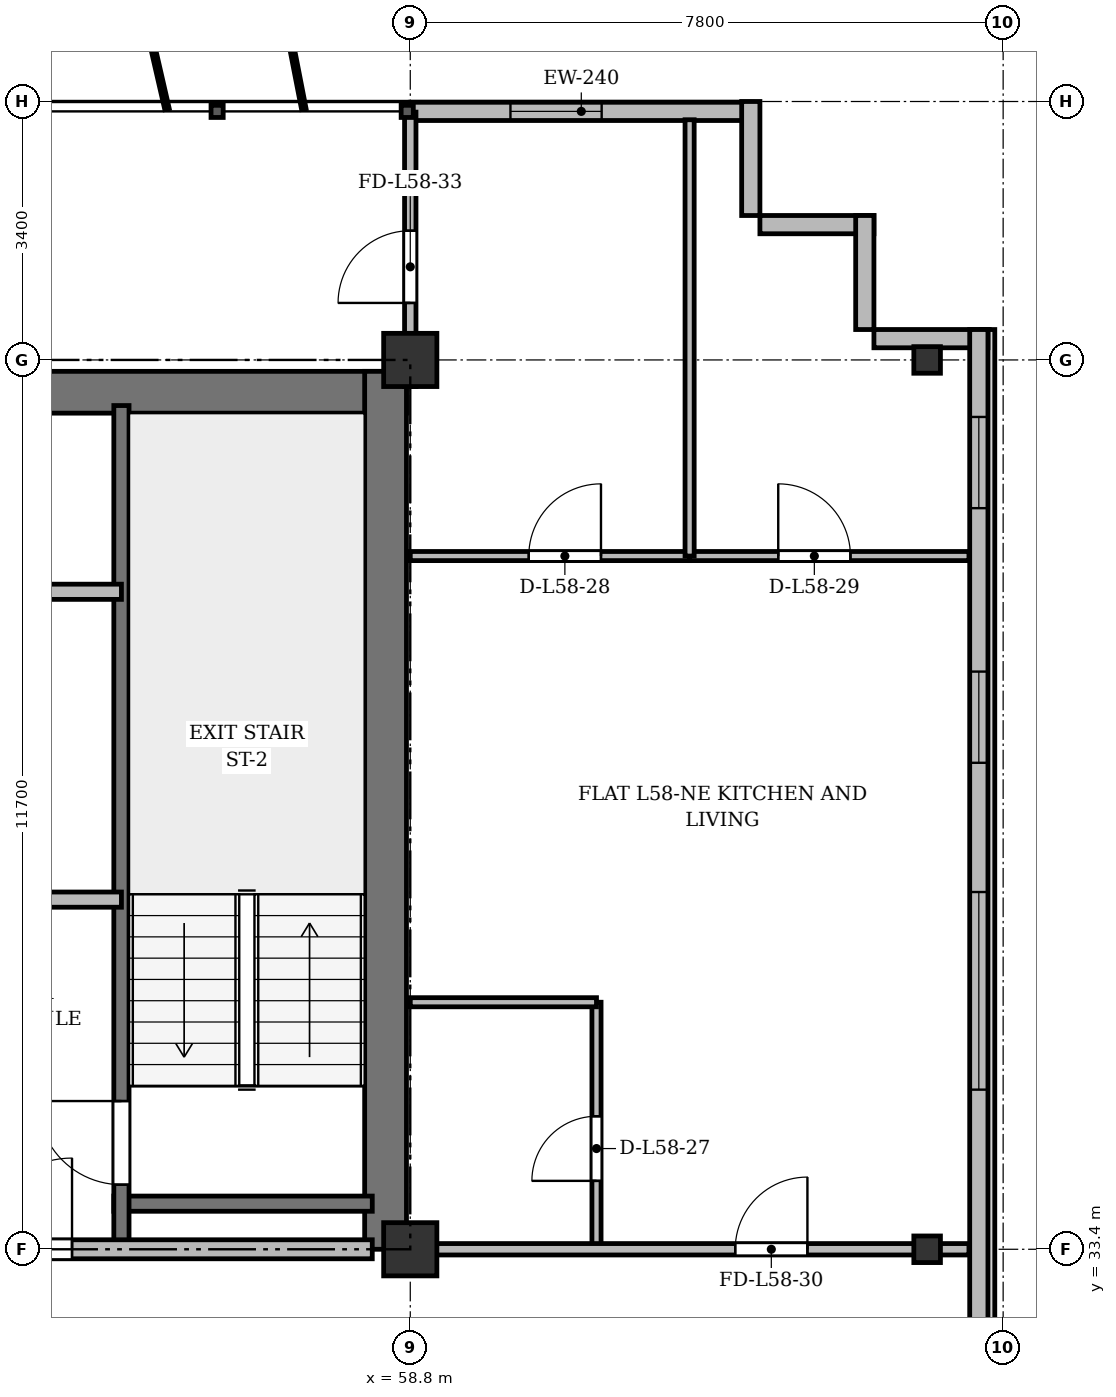
"""IFC4 building model, lengths in metres.
Left out: names, types, materials, properties, quantities, classifications, styles, units other than length and angle.
Written with IfcOpenShell. Run it as: python <this file> out.ifc"""

import sys

from ifc_helpers import new_model, si_unit, direction, frame, frame_2d, origin, origin_2d, place, context, subcontext, project, spatial, rectangle, i_section, extrude, source, transform, mapped, element, fill, save


model = new_model("IFC4")
c1 = context("Model", 3, precision=1e-05, world=origin(), true_north=direction((0.0, 1.0)))
c2 = subcontext(c1, "Body", "Model", "MODEL_VIEW")
j1 = project(units=[si_unit("LENGTHUNIT", "METRE"), si_unit("PLANEANGLEUNIT", "RADIAN")], contexts=[c1])
p1 = place(None, origin())
s1 = spatial("IfcSite", under=j1, at=p1, CompositionType="ELEMENT")
p2 = place(p1, origin())
s2 = spatial("IfcBuilding", under=s1, at=p2, CompositionType="ELEMENT")
p3 = place(p2, frame((0.0, 0.0, 222.9)))
s3 = spatial("IfcBuildingStorey", under=s2, at=p3, CompositionType="ELEMENT", Elevation=222.9)
m1 = source(origin(), c2, "Body", "SweptSolid", [
    extrude(rectangle(XDim=0.7, YDim=0.7, at=origin_2d()), origin(), (0.0, 0.0, 1.0), 3.6),
])
for number, where, z_axis, x_axis in (
    (1, (58.8, 33.4, 0.0), (0.0, 0.0, 1.0), (1.0, 0.0, 0.0)),
    (2, (58.8, 45.1, 0.0), (0.0, 0.0, 1.0), (1.0, 0.0, 0.0)),
):
    element("IfcColumn", number, at=place(p3, frame(where, z_axis=z_axis, x_axis=x_axis)), inside=s3, PredefinedType="COLUMN", context=c2, shape_type="MappedRepresentation", body=[
        mapped(m1, transform((0.0, 0.0, 0.0), x_axis=(1.0, 0.0, 0.0), y_axis=(0.0, 1.0, 0.0), z_axis=(0.0, 0.0, 1.0), scale=1.0)),
    ])
m2 = source(origin(), c2, "Body", "SweptSolid", [
    extrude(i_section(OverallWidth=0.35, OverallDepth=0.35, WebThickness=0.018, FlangeThickness=0.028, at=origin_2d()), origin(), (0.0, 0.0, 1.0), 3.6),
])
for number, where, z_axis, x_axis in (
    (3, (65.6, 33.4, 0.0), (0.0, 0.0, 1.0), (1.0, 0.0, 0.0)),
    (4, (65.6, 45.1, 0.0), (0.0, 0.0, 1.0), (1.0, 0.0, 0.0)),
):
    element("IfcColumn", number, at=place(p3, frame(where, z_axis=z_axis, x_axis=x_axis)), inside=s3, PredefinedType="COLUMN", context=c2, shape_type="MappedRepresentation", body=[
        mapped(m2, transform((0.0, 0.0, 0.0), x_axis=(1.0, 0.0, 0.0), y_axis=(0.0, 1.0, 0.0), z_axis=(0.0, 0.0, 1.0), scale=1.0)),
    ])
p4 = place(p3, frame((58.8, 48.37, 0.0), z_axis=(0.0, 0.0, 1.0), x_axis=(1.0, 0.0, 0.0)))
e5 = element("IfcWall", 5, at=p4, inside=s3, PredefinedType="SOLIDWALL", context=c2, shape_type="SweptSolid", body=[
    extrude(rectangle(XDim=4.5, YDim=0.24, at=frame_2d((2.25, 0.0))), origin(), (0.0, 0.0, 1.0), 3.36),
])
p5 = place(p4, frame((1.318, 0.0, 0.9)))
e6 = element("IfcOpeningElement", 6, at=p5, cuts=e5, PredefinedType="OPENING", context=c2, shape_type="SweptSolid", body=[
    extrude(rectangle(XDim=1.2, YDim=1.65, at=frame_2d((0.6, 0.825))), frame((0.0, 0.13, 0.0), z_axis=(0.0, -1.0, 0.0), x_axis=(1.0, 0.0, 0.0)), (0.0, 0.0, 1.0), 0.26),
])
for number, where, z_axis, x_axis in (
    (7, (63.28, 48.5, 0.0), (0.0, 0.0, 1.0), (0.0, -1.0, 0.0)),
    (8, (63.4, 46.88, 0.0), (0.0, 0.0, 1.0), (1.0, 0.0, 0.0)),
    (9, (64.78, 47.0, 0.0), (0.0, 0.0, 1.0), (0.0, -1.0, 0.0)),
    (10, (64.9, 45.38, 0.0), (0.0, 0.0, 1.0), (1.0, 0.0, 0.0)),
):
    element("IfcWall", number, at=place(p3, frame(where, z_axis=z_axis, x_axis=x_axis)), inside=s3, PredefinedType="SOLIDWALL", context=c2, shape_type="SweptSolid", body=[
        extrude(rectangle(XDim=1.5, YDim=0.24, at=frame_2d((0.75, 0.0))), origin(), (0.0, 0.0, 1.0), 3.36),
    ])
p6 = place(p3, frame((66.28, 45.5, 0.0), z_axis=(0.0, 0.0, 1.0), x_axis=(0.0, -1.0, 0.0)))
e11 = element("IfcWall", 11, at=p6, inside=s3, PredefinedType="SOLIDWALL", context=c2, shape_type="SweptSolid", body=[
    extrude(rectangle(XDim=39.1, YDim=0.24, at=frame_2d((19.55, 0.0))), origin(), (0.0, 0.0, 1.0), 3.36),
])
p7 = place(p6, frame((36.45, 0.0, 0.92)))
e12 = element("IfcOpeningElement", 12, at=p7, cuts=e11, PredefinedType="OPENING", context=c2, shape_type="SweptSolid", body=[
    extrude(rectangle(XDim=1.2, YDim=1.65, at=frame_2d((0.6, 0.825))), frame((0.0, 0.13, 0.0), z_axis=(0.0, -1.0, 0.0), x_axis=(1.0, 0.0, 0.0)), (0.0, 0.0, 1.0), 0.26),
])
p8 = place(p6, frame((32.8, 0.0, 0.92)))
e13 = element("IfcOpeningElement", 13, at=p8, cuts=e11, PredefinedType="OPENING", context=c2, shape_type="SweptSolid", body=[
    extrude(rectangle(XDim=2.6, YDim=1.9, at=frame_2d((1.3, 0.95))), frame((0.0, 0.13, 0.0), z_axis=(0.0, -1.0, 0.0), x_axis=(1.0, 0.0, 0.0)), (0.0, 0.0, 1.0), 0.26),
])
p9 = place(p6, frame((28.6, 0.0, 0.92)))
e14 = element("IfcOpeningElement", 14, at=p9, cuts=e11, PredefinedType="OPENING", context=c2, shape_type="SweptSolid", body=[
    extrude(rectangle(XDim=2.6, YDim=1.9, at=frame_2d((1.3, 0.95))), frame((0.0, 0.13, 0.0), z_axis=(0.0, -1.0, 0.0), x_axis=(1.0, 0.0, 0.0)), (0.0, 0.0, 1.0), 0.26),
])
p10 = place(p6, frame((21.4, 0.0, 0.92)))
e15 = element("IfcOpeningElement", 15, at=p10, cuts=e11, PredefinedType="OPENING", context=c2, shape_type="SweptSolid", body=[
    extrude(rectangle(XDim=2.6, YDim=1.9, at=frame_2d((1.3, 0.95))), frame((0.0, 0.13, 0.0), z_axis=(0.0, -1.0, 0.0), x_axis=(1.0, 0.0, 0.0)), (0.0, 0.0, 1.0), 0.26),
])
p11 = place(p6, frame((7.4, 0.0, 0.92)))
e16 = element("IfcOpeningElement", 16, at=p11, cuts=e11, PredefinedType="OPENING", context=c2, shape_type="SweptSolid", body=[
    extrude(rectangle(XDim=2.6, YDim=1.9, at=frame_2d((1.3, 0.95))), frame((0.0, 0.13, 0.0), z_axis=(0.0, -1.0, 0.0), x_axis=(1.0, 0.0, 0.0)), (0.0, 0.0, 1.0), 0.26),
])
p12 = place(p6, frame((4.5, 0.0, 0.92)))
e17 = element("IfcOpeningElement", 17, at=p12, cuts=e11, PredefinedType="OPENING", context=c2, shape_type="SweptSolid", body=[
    extrude(rectangle(XDim=1.2, YDim=1.65, at=frame_2d((0.6, 0.825))), frame((0.0, 0.13, 0.0), z_axis=(0.0, -1.0, 0.0), x_axis=(1.0, 0.0, 0.0)), (0.0, 0.0, 1.0), 0.26),
])
p13 = place(p6, frame((1.15, 0.0, 0.92)))
e18 = element("IfcOpeningElement", 18, at=p13, cuts=e11, PredefinedType="OPENING", context=c2, shape_type="SweptSolid", body=[
    extrude(rectangle(XDim=1.2, YDim=1.65, at=frame_2d((0.6, 0.825))), frame((0.0, 0.13, 0.0), z_axis=(0.0, -1.0, 0.0), x_axis=(1.0, 0.0, 0.0)), (0.0, 0.0, 1.0), 0.26),
])
p14 = place(p3, frame((15.65, 44.675, 0.0), z_axis=(0.0, 0.0, 1.0), x_axis=(1.0, 0.0, 0.0)))
e19 = element("IfcWall", 19, at=p14, inside=s3, PredefinedType="SHEAR", context=c2, shape_type="SweptSolid", body=[
    extrude(rectangle(XDim=43.1, YDim=0.55, at=frame_2d((21.55, 0.0))), origin(), (0.0, 0.0, 1.0), 3.36),
])
p15 = place(p3, frame((58.475, 33.4, 0.0), z_axis=(0.0, 0.0, 1.0), x_axis=(0.0, 1.0, 0.0)))
e20 = element("IfcWall", 20, at=p15, inside=s3, PredefinedType="SHEAR", context=c2, shape_type="SweptSolid", body=[
    extrude(rectangle(XDim=11.55, YDim=0.55, at=frame_2d((5.775, 0.0))), origin(), (0.0, 0.0, 1.0), 3.36),
])
p16 = place(p3, frame((54.9, 34.0, 0.0), z_axis=(0.0, 0.0, 1.0), x_axis=(1.0, 0.0, 0.0)))
e21 = element("IfcWall", 21, at=p16, inside=s3, PredefinedType="SHEAR", context=c2, shape_type="SweptSolid", body=[
    extrude(rectangle(XDim=3.4, YDim=0.2, at=frame_2d((1.7, 0.0))), origin(), (0.0, 0.0, 1.0), 3.36),
])
p17 = place(p3, frame((55.0, 33.4, 0.0), z_axis=(0.0, 0.0, 1.0), x_axis=(0.0, 1.0, 0.0)))
e22 = element("IfcWall", 22, at=p17, inside=s3, PredefinedType="SHEAR", context=c2, shape_type="SweptSolid", body=[
    extrude(rectangle(XDim=11.1, YDim=0.2, at=frame_2d((5.55, 0.0))), origin(), (0.0, 0.0, 1.0), 3.36),
])
p18 = place(p17, frame((0.85, 0.0, 0.0)))
e23 = element("IfcOpeningElement", 23, at=p18, cuts=e22, PredefinedType="OPENING", context=c2, shape_type="SweptSolid", body=[
    extrude(rectangle(XDim=1.1, YDim=2.15, at=frame_2d((0.55, 1.075))), frame((0.0, 0.11, 0.0), z_axis=(0.0, -1.0, 0.0), x_axis=(1.0, 0.0, 0.0)), (0.0, 0.0, 1.0), 0.22),
])
p19 = place(p3, frame((47.15, 42.05, 0.0), z_axis=(0.0, 0.0, 1.0), x_axis=(1.0, 0.0, 0.0)))
e24 = element("IfcWall", 24, at=p19, inside=s3, PredefinedType="SOLIDWALL", context=c2, shape_type="SweptSolid", body=[
    extrude(rectangle(XDim=7.85, YDim=0.2, at=frame_2d((3.925, 0.0))), origin(), (0.0, 0.0, 1.0), 2.86),
])
p20 = place(p19, frame((0.75, 0.0, 0.0)))
e25 = element("IfcOpeningElement", 25, at=p20, cuts=e24, PredefinedType="OPENING", context=c2, shape_type="SweptSolid", body=[
    extrude(rectangle(XDim=0.9, YDim=2.1, at=frame_2d((0.45, 1.05))), frame((0.0, 0.11, 0.0), z_axis=(0.0, -1.0, 0.0), x_axis=(1.0, 0.0, 0.0)), (0.0, 0.0, 1.0), 0.22),
])
p21 = place(p19, frame((3.85, 0.0, 0.0)))
e26 = element("IfcOpeningElement", 26, at=p21, cuts=e24, PredefinedType="OPENING", context=c2, shape_type="SweptSolid", body=[
    extrude(rectangle(XDim=0.9, YDim=2.1, at=frame_2d((0.45, 1.05))), frame((0.0, 0.11, 0.0), z_axis=(0.0, -1.0, 0.0), x_axis=(1.0, 0.0, 0.0)), (0.0, 0.0, 1.0), 0.22),
])
p22 = place(p3, frame((52.45, 38.0, 0.0), z_axis=(0.0, 0.0, 1.0), x_axis=(1.0, 0.0, 0.0)))
e27 = element("IfcWall", 27, at=p22, inside=s3, PredefinedType="PARTITIONING", context=c2, shape_type="SweptSolid", body=[
    extrude(rectangle(XDim=2.55, YDim=0.2, at=frame_2d((1.275, 0.0))), origin(), (0.0, 0.0, 1.0), 3.36),
])
p23 = place(p3, frame((47.15, 33.4, 0.0), z_axis=(0.0, 0.0, 1.0), x_axis=(1.0, 0.0, 0.0)))
e28 = element("IfcWall", 28, at=p23, inside=s3, PredefinedType="PARTITIONING", context=c2, shape_type="SweptSolid", body=[
    extrude(rectangle(XDim=11.15, YDim=0.25, at=frame_2d((5.575, 0.0))), origin(), (0.0, 0.0, 1.0), 2.91),
])
p24 = place(p23, frame((0.7, 0.0, 0.0)))
e29 = element("IfcOpeningElement", 29, at=p24, cuts=e28, PredefinedType="OPENING", context=c2, shape_type="SweptSolid", body=[
    extrude(rectangle(XDim=0.95, YDim=2.15, at=frame_2d((0.475, 1.075))), frame((0.0, 0.135, 0.0), z_axis=(0.0, -1.0, 0.0), x_axis=(1.0, 0.0, 0.0)), (0.0, 0.0, 1.0), 0.27),
])
p25 = place(p23, frame((6.0, 0.0, 0.0)))
e30 = element("IfcOpeningElement", 30, at=p25, cuts=e28, PredefinedType="OPENING", context=c2, shape_type="SweptSolid", body=[
    extrude(rectangle(XDim=1.2, YDim=2.15, at=frame_2d((0.6, 1.075))), frame((0.0, 0.135, 0.0), z_axis=(0.0, -1.0, 0.0), x_axis=(1.0, 0.0, 0.0)), (0.0, 0.0, 1.0), 0.27),
])
p26 = place(p3, frame((61.25, 33.4, 0.0), z_axis=(0.0, 0.0, 1.0), x_axis=(0.0, 1.0, 0.0)))
e31 = element("IfcWall", 31, at=p26, inside=s3, PredefinedType="PARTITIONING", context=c2, shape_type="SweptSolid", body=[
    extrude(rectangle(XDim=3.25, YDim=0.12, at=frame_2d((1.625, 0.0))), origin(), (0.0, 0.0, 1.0), 2.91),
])
p27 = place(p26, frame((0.9, 0.0, 0.0)))
e32 = element("IfcOpeningElement", 32, at=p27, cuts=e31, PredefinedType="OPENING", context=c2, shape_type="SweptSolid", body=[
    extrude(rectangle(XDim=0.85, YDim=2.1, at=frame_2d((0.425, 1.05))), frame((0.0, 0.07, 0.0), z_axis=(0.0, -1.0, 0.0), x_axis=(1.0, 0.0, 0.0)), (0.0, 0.0, 1.0), 0.14),
])
p28 = place(p3, frame((58.8, 36.65, 0.0), z_axis=(0.0, 0.0, 1.0), x_axis=(1.0, 0.0, 0.0)))
e33 = element("IfcWall", 33, at=p28, inside=s3, PredefinedType="PARTITIONING", context=c2, shape_type="SweptSolid", body=[
    extrude(rectangle(XDim=2.45, YDim=0.12, at=frame_2d((1.225, 0.0))), origin(), (0.0, 0.0, 1.0), 2.86),
])
p29 = place(p3, frame((58.8, 42.52, 0.0), z_axis=(0.0, 0.0, 1.0), x_axis=(1.0, 0.0, 0.0)))
e34 = element("IfcWall", 34, at=p29, inside=s3, PredefinedType="PARTITIONING", context=c2, shape_type="SweptSolid", body=[
    extrude(rectangle(XDim=3.675, YDim=0.12, at=frame_2d((1.837, 0.0))), origin(), (0.0, 0.0, 1.0), 2.86),
])
p30 = place(p29, frame((1.559, 0.0, 0.0)))
e35 = element("IfcOpeningElement", 35, at=p30, cuts=e34, PredefinedType="OPENING", context=c2, shape_type="SweptSolid", body=[
    extrude(rectangle(XDim=0.95, YDim=2.15, at=frame_2d((0.475, 1.075))), frame((0.0, 0.07, 0.0), z_axis=(0.0, -1.0, 0.0), x_axis=(1.0, 0.0, 0.0)), (0.0, 0.0, 1.0), 0.14),
])
p31 = place(p3, frame((62.475, 42.52, 0.0), z_axis=(0.0, 0.0, 1.0), x_axis=(1.0, 0.0, 0.0)))
e36 = element("IfcWall", 36, at=p31, inside=s3, PredefinedType="PARTITIONING", context=c2, shape_type="SweptSolid", body=[
    extrude(rectangle(XDim=3.675, YDim=0.12, at=frame_2d((1.837, 0.0))), origin(), (0.0, 0.0, 1.0), 2.86),
])
p32 = place(p31, frame((1.166, 0.0, 0.0)))
e37 = element("IfcOpeningElement", 37, at=p32, cuts=e36, PredefinedType="OPENING", context=c2, shape_type="SweptSolid", body=[
    extrude(rectangle(XDim=0.95, YDim=2.15, at=frame_2d((0.475, 1.075))), frame((0.0, 0.07, 0.0), z_axis=(0.0, -1.0, 0.0), x_axis=(1.0, 0.0, 0.0)), (0.0, 0.0, 1.0), 0.14),
])
p33 = place(p3, frame((62.475, 42.52, 0.0), z_axis=(0.0, 0.0, 1.0), x_axis=(0.0, 1.0, 0.0)))
e38 = element("IfcWall", 38, at=p33, inside=s3, PredefinedType="PARTITIONING", context=c2, shape_type="SweptSolid", body=[
    extrude(rectangle(XDim=5.74, YDim=0.12, at=frame_2d((2.87, 0.0))), origin(), (0.0, 0.0, 1.0), 2.91),
])
p34 = place(p3, frame((58.8, 33.4, 0.0), z_axis=(0.0, 0.0, 1.0), x_axis=(1.0, 0.0, 0.0)))
e39 = element("IfcWall", 39, at=p34, inside=s3, PredefinedType="PARTITIONING", context=c2, shape_type="SweptSolid", body=[
    extrude(rectangle(XDim=7.35, YDim=0.15, at=frame_2d((3.675, 0.0))), origin(), (0.0, 0.0, 1.0), 2.91),
])
p35 = place(p34, frame((4.275, 0.0, 0.0)))
e40 = element("IfcOpeningElement", 40, at=p35, cuts=e39, PredefinedType="OPENING", context=c2, shape_type="SweptSolid", body=[
    extrude(rectangle(XDim=0.95, YDim=2.15, at=frame_2d((0.475, 1.075))), frame((0.0, 0.085, 0.0), z_axis=(0.0, -1.0, 0.0), x_axis=(1.0, 0.0, 0.0)), (0.0, 0.0, 1.0), 0.17),
])
p36 = place(p3, frame((58.8, 44.75, 0.0), z_axis=(0.0, 0.0, 1.0), x_axis=(0.0, 1.0, 0.0)))
e41 = element("IfcWall", 41, at=p36, inside=s3, PredefinedType="PARTITIONING", context=c2, shape_type="SweptSolid", body=[
    extrude(rectangle(XDim=3.61, YDim=0.15, at=frame_2d((1.805, 0.0))), origin(), (0.0, 0.0, 1.0), 2.86),
])
p37 = place(p36, frame((1.1, 0.0, 0.0)))
e42 = element("IfcOpeningElement", 42, at=p37, cuts=e41, PredefinedType="OPENING", context=c2, shape_type="SweptSolid", body=[
    extrude(rectangle(XDim=0.95, YDim=2.15, at=frame_2d((0.475, 1.075))), frame((0.0, 0.085, 0.0), z_axis=(0.0, -1.0, 0.0), x_axis=(1.0, 0.0, 0.0)), (0.0, 0.0, 1.0), 0.17),
])
m3 = source(origin(), c2, "Body", "SweptSolid", [
    extrude(rectangle(XDim=1.2, YDim=1.65, at=frame_2d((0.6, 0.825))), frame((0.0, 0.03, 0.0), z_axis=(0.0, -1.0, 0.0), x_axis=(1.0, 0.0, 0.0)), (0.0, 0.0, 1.0), 0.06),
])
p38 = place(p5, origin())
e43 = element("IfcWindow", 43, at=p38, inside=s3, PartitioningType="SINGLE_PANEL", PredefinedType="WINDOW", context=c2, shape_type="MappedRepresentation", body=[
    mapped(m3, transform((0.0, 0.0, 0.0), x_axis=(1.0, 0.0, 0.0), y_axis=(0.0, 1.0, 0.0), z_axis=(0.0, 0.0, 1.0), scale=1.0)),
])
fill(e6, e43)
m4 = source(origin(), c2, "Body", "SweptSolid", [
    extrude(rectangle(XDim=2.6, YDim=1.9, at=frame_2d((1.3, 0.95))), frame((0.0, 0.03, 0.0), z_axis=(0.0, -1.0, 0.0), x_axis=(1.0, 0.0, 0.0)), (0.0, 0.0, 1.0), 0.06),
])
p39 = place(p11, origin())
e44 = element("IfcWindow", 44, at=p39, inside=s3, PartitioningType="SINGLE_PANEL", PredefinedType="WINDOW", context=c2, shape_type="MappedRepresentation", body=[
    mapped(m4, transform((0.0, 0.0, 0.0), x_axis=(1.0, 0.0, 0.0), y_axis=(0.0, 1.0, 0.0), z_axis=(0.0, 0.0, 1.0), scale=1.0)),
])
fill(e16, e44)
p40 = place(p12, origin())
e45 = element("IfcWindow", 45, at=p40, inside=s3, PartitioningType="SINGLE_PANEL", PredefinedType="WINDOW", context=c2, shape_type="MappedRepresentation", body=[
    mapped(m3, transform((0.0, 0.0, 0.0), x_axis=(1.0, 0.0, 0.0), y_axis=(0.0, 1.0, 0.0), z_axis=(0.0, 0.0, 1.0), scale=1.0)),
])
fill(e17, e45)
p41 = place(p13, origin())
e46 = element("IfcWindow", 46, at=p41, inside=s3, PartitioningType="SINGLE_PANEL", PredefinedType="WINDOW", context=c2, shape_type="MappedRepresentation", body=[
    mapped(m3, transform((0.0, 0.0, 0.0), x_axis=(1.0, 0.0, 0.0), y_axis=(0.0, 1.0, 0.0), z_axis=(0.0, 0.0, 1.0), scale=1.0)),
])
fill(e18, e46)
m5 = source(origin(), c2, "Body", "SweptSolid", [
    extrude(rectangle(XDim=1.1, YDim=2.15, at=frame_2d((0.55, 1.075))), frame((0.0, 0.025, 0.0), z_axis=(0.0, -1.0, 0.0), x_axis=(1.0, 0.0, 0.0)), (0.0, 0.0, 1.0), 0.05),
])
p42 = place(p18, origin())
e47 = element("IfcDoor", 47, at=p42, inside=s3, OperationType="SINGLE_SWING_RIGHT", PredefinedType="DOOR", context=c2, shape_type="MappedRepresentation", body=[
    mapped(m5, transform((0.0, 0.0, 0.0), x_axis=(1.0, 0.0, 0.0), y_axis=(0.0, 1.0, 0.0), z_axis=(0.0, 0.0, 1.0), scale=1.0)),
])
fill(e23, e47)
m6 = source(origin(), c2, "Body", "SweptSolid", [
    extrude(rectangle(XDim=1.2, YDim=2.15, at=frame_2d((0.6, 1.075))), frame((0.0, 0.025, 0.0), z_axis=(0.0, -1.0, 0.0), x_axis=(1.0, 0.0, 0.0)), (0.0, 0.0, 1.0), 0.05),
])
p43 = place(p25, origin())
e48 = element("IfcDoor", 48, at=p43, inside=s3, OperationType="SINGLE_SWING_RIGHT", PredefinedType="DOOR", context=c2, shape_type="MappedRepresentation", body=[
    mapped(m6, transform((0.0, 0.0, 0.0), x_axis=(1.0, 0.0, 0.0), y_axis=(0.0, 1.0, 0.0), z_axis=(0.0, 0.0, 1.0), scale=1.0)),
])
fill(e30, e48)
m7 = source(origin(), c2, "Body", "SweptSolid", [
    extrude(rectangle(XDim=0.85, YDim=2.1, at=frame_2d((0.425, 1.05))), frame((0.0, 0.025, 0.0), z_axis=(0.0, -1.0, 0.0), x_axis=(1.0, 0.0, 0.0)), (0.0, 0.0, 1.0), 0.05),
])
p44 = place(p27, origin())
e49 = element("IfcDoor", 49, at=p44, inside=s3, OperationType="SINGLE_SWING_LEFT", PredefinedType="DOOR", context=c2, shape_type="MappedRepresentation", body=[
    mapped(m7, transform((0.0, 0.0, 0.0), x_axis=(1.0, 0.0, 0.0), y_axis=(0.0, 1.0, 0.0), z_axis=(0.0, 0.0, 1.0), scale=1.0)),
])
fill(e32, e49)
m8 = source(origin(), c2, "Body", "SweptSolid", [
    extrude(rectangle(XDim=0.95, YDim=2.15, at=frame_2d((0.475, 1.075))), frame((0.0, 0.025, 0.0), z_axis=(0.0, -1.0, 0.0), x_axis=(1.0, 0.0, 0.0)), (0.0, 0.0, 1.0), 0.05),
])
p45 = place(p30, origin())
e50 = element("IfcDoor", 50, at=p45, inside=s3, OperationType="SINGLE_SWING_RIGHT", PredefinedType="DOOR", context=c2, shape_type="MappedRepresentation", body=[
    mapped(m8, transform((0.0, 0.0, 0.0), x_axis=(1.0, 0.0, 0.0), y_axis=(0.0, 1.0, 0.0), z_axis=(0.0, 0.0, 1.0), scale=1.0)),
])
fill(e35, e50)
p46 = place(p32, origin())
e51 = element("IfcDoor", 51, at=p46, inside=s3, OperationType="SINGLE_SWING_LEFT", PredefinedType="DOOR", context=c2, shape_type="MappedRepresentation", body=[
    mapped(m8, transform((0.0, 0.0, 0.0), x_axis=(1.0, 0.0, 0.0), y_axis=(0.0, 1.0, 0.0), z_axis=(0.0, 0.0, 1.0), scale=1.0)),
])
fill(e37, e51)
p47 = place(p35, origin())
e52 = element("IfcDoor", 52, at=p47, inside=s3, OperationType="SINGLE_SWING_RIGHT", PredefinedType="DOOR", context=c2, shape_type="MappedRepresentation", body=[
    mapped(m8, transform((0.0, 0.0, 0.0), x_axis=(1.0, 0.0, 0.0), y_axis=(0.0, 1.0, 0.0), z_axis=(0.0, 0.0, 1.0), scale=1.0)),
])
fill(e40, e52)
p48 = place(p37, origin())
e53 = element("IfcDoor", 53, at=p48, inside=s3, OperationType="SINGLE_SWING_LEFT", PredefinedType="DOOR", context=c2, shape_type="MappedRepresentation", body=[
    mapped(m8, transform((0.0, 0.0, 0.0), x_axis=(1.0, 0.0, 0.0), y_axis=(0.0, 1.0, 0.0), z_axis=(0.0, 0.0, 1.0), scale=1.0)),
])
fill(e42, e53)
save(model, sys.argv[1])
